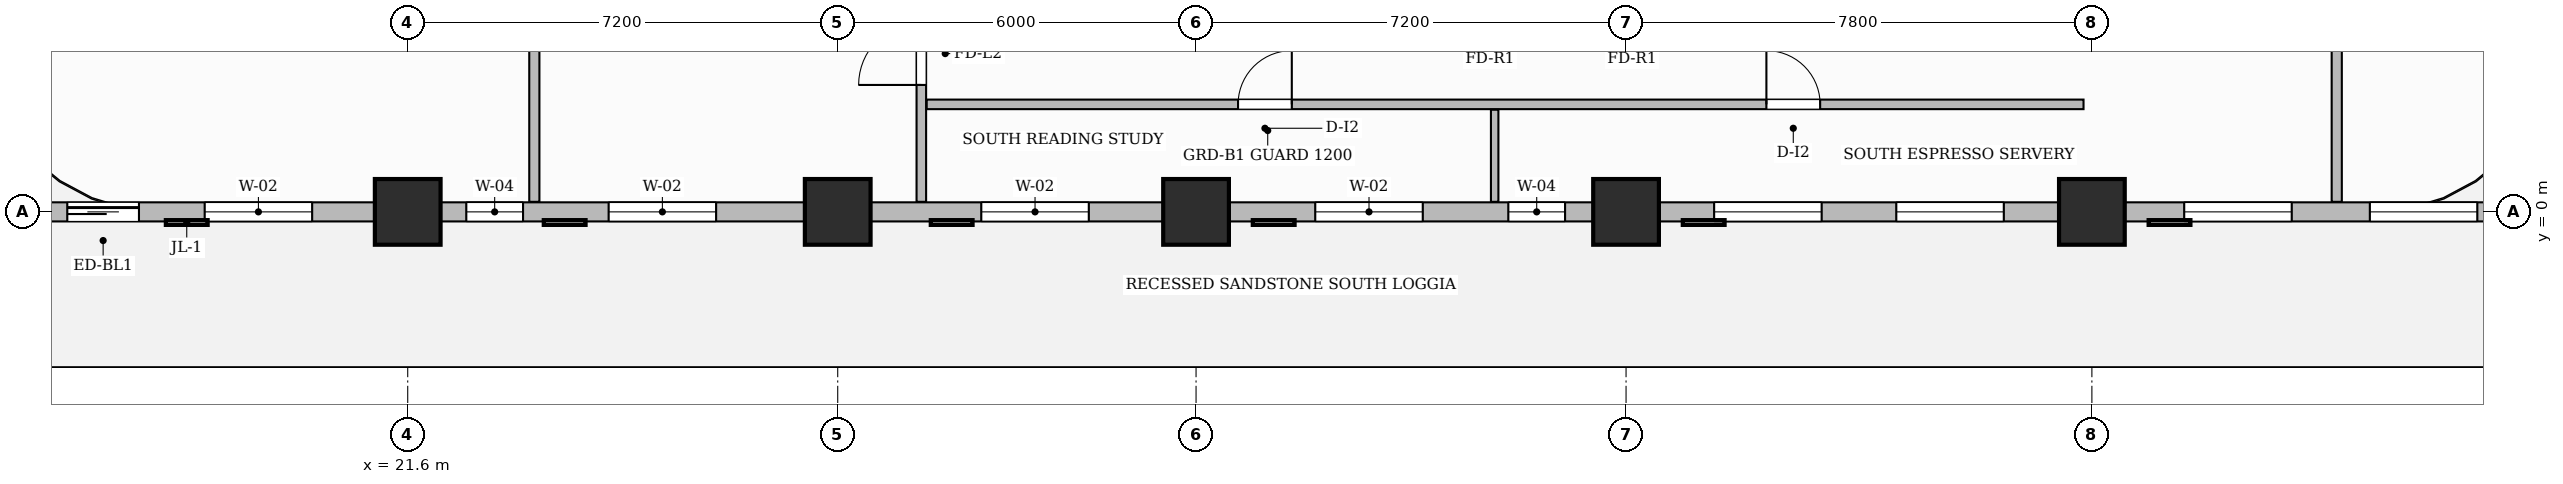
"""IFC4 building model, lengths in metres.
Left out: names, types, materials, properties, quantities, classifications, styles, units other than length and angle.
Written with IfcOpenShell. Run it as: python <this file> out.ifc"""

import sys

from ifc_helpers import new_model, si_unit, direction, frame, frame_2d, origin, origin_2d, place, context, subcontext, project, spatial, rectangle, extrude, source, transform, mapped, element, fill, save


model = new_model("IFC4")
c1 = context("Model", 3, precision=1e-05, world=origin(), true_north=direction((0.0, 1.0)))
c2 = subcontext(c1, "Body", "Model", "MODEL_VIEW")
j1 = project(units=[si_unit("LENGTHUNIT", "METRE"), si_unit("PLANEANGLEUNIT", "RADIAN")], contexts=[c1])
p1 = place(None, origin())
s1 = spatial("IfcSite", under=j1, at=p1, CompositionType="ELEMENT")
p2 = place(p1, origin())
s2 = spatial("IfcBuilding", under=s1, at=p2, CompositionType="ELEMENT")
p3 = place(p2, frame((0.0, 0.0, 39.8)))
s3 = spatial("IfcBuildingStorey", under=s2, at=p3, CompositionType="ELEMENT", Elevation=39.8)
m1 = source(origin(), c2, "Body", "SweptSolid", [
    extrude(rectangle(XDim=1.1, YDim=1.1, at=origin_2d()), origin(), (0.0, 0.0, 1.0), 3.7),
])
for number, where, z_axis, x_axis in (
    (1, (21.6, 0.0, 0.0), (0.0, 0.0, 1.0), (1.0, 0.0, 0.0)),
    (2, (28.8, 0.0, 0.0), (0.0, 0.0, 1.0), (1.0, 0.0, 0.0)),
    (3, (34.8, 0.0, 0.0), (0.0, 0.0, 1.0), (1.0, 0.0, 0.0)),
    (4, (42.0, 0.0, 0.0), (0.0, 0.0, 1.0), (1.0, 0.0, 0.0)),
    (5, (49.8, 0.0, 0.0), (0.0, 0.0, 1.0), (1.0, 0.0, 0.0)),
):
    element("IfcColumn", number, at=place(p3, frame(where, z_axis=z_axis, x_axis=x_axis)), inside=s3, PredefinedType="COLUMN", context=c2, shape_type="MappedRepresentation", body=[
        mapped(m1, transform((0.0, 0.0, 0.0), scale=1.0)),
    ])
p4 = place(p3, frame((30.2, 0.168, 0.0), z_axis=(0.0, 0.0, 1.0), x_axis=(0.0, 1.0, 0.0)))
e6 = element("IfcWall", 6, at=p4, inside=s3, PredefinedType="PARTITIONING", context=c2, shape_type="SweptSolid", body=[
    extrude(rectangle(XDim=9.492, YDim=0.16, at=frame_2d((4.746, 0.0))), origin(), (0.0, 0.0, 1.0), 3.45),
])
p5 = place(p4, frame((1.957, 0.0, 0.0)))
e7 = element("IfcOpeningElement", 7, at=p5, cuts=e6, PredefinedType="OPENING", context=c2, shape_type="SweptSolid", body=[
    extrude(rectangle(XDim=1.05, YDim=2.15, at=frame_2d((0.525, 1.075))), frame((0.0, 0.09, 0.0), z_axis=(0.0, -1.0, 0.0), x_axis=(1.0, 0.0, 0.0)), (0.0, 0.0, 1.0), 0.18),
])
p6 = place(p3, frame((30.29, 1.8, 0.0), z_axis=(0.0, 0.0, 1.0), x_axis=(1.0, 0.0, 0.0)))
e8 = element("IfcWall", 8, at=p6, inside=s3, PredefinedType="PARTITIONING", context=c2, shape_type="SweptSolid", body=[
    extrude(rectangle(XDim=19.37, YDim=0.16, at=frame_2d((9.685, 0.0))), origin(), (0.0, 0.0, 1.0), 3.45),
])
p7 = place(p6, frame((5.213, 0.0, 0.0)))
e9 = element("IfcOpeningElement", 9, at=p7, cuts=e8, PredefinedType="OPENING", context=c2, shape_type="SweptSolid", body=[
    extrude(rectangle(XDim=0.9, YDim=2.15, at=frame_2d((0.45, 1.075))), frame((0.0, 0.09, 0.0), z_axis=(0.0, -1.0, 0.0), x_axis=(1.0, 0.0, 0.0)), (0.0, 0.0, 1.0), 0.18),
])
p8 = place(p6, frame((14.06, 0.0, 0.0)))
e10 = element("IfcOpeningElement", 10, at=p8, cuts=e8, PredefinedType="OPENING", context=c2, shape_type="SweptSolid", body=[
    extrude(rectangle(XDim=0.9, YDim=2.15, at=frame_2d((0.45, 1.075))), frame((0.0, 0.09, 0.0), z_axis=(0.0, -1.0, 0.0), x_axis=(1.0, 0.0, 0.0)), (0.0, 0.0, 1.0), 0.18),
])
p9 = place(p3, frame((39.8, 0.168, 0.0), z_axis=(0.0, 0.0, 1.0), x_axis=(0.0, 1.0, 0.0)))
e11 = element("IfcWall", 11, at=p9, inside=s3, PredefinedType="PARTITIONING", context=c2, shape_type="SweptSolid", body=[
    extrude(rectangle(XDim=1.542, YDim=0.125, at=frame_2d((0.771, 0.0))), origin(), (0.0, 0.0, 1.0), 3.45),
])
p10 = place(p3, frame((53.9, 0.168, 0.0), z_axis=(0.0, 0.0, 1.0), x_axis=(0.0, 1.0, 0.0)))
e12 = element("IfcWall", 12, at=p10, inside=s3, PredefinedType="PARTITIONING", context=c2, shape_type="SweptSolid", body=[
    extrude(rectangle(XDim=14.142, YDim=0.17, at=frame_2d((7.071, 0.0))), origin(), (0.0, 0.0, 1.0), 3.035),
])
p11 = place(p3, frame((23.72, 0.168, 0.0), z_axis=(0.0, 0.0, 1.0), x_axis=(0.0, 1.0, 0.0)))
e13 = element("IfcWall", 13, at=p11, inside=s3, PredefinedType="PARTITIONING", context=c2, shape_type="SweptSolid", body=[
    extrude(rectangle(XDim=9.492, YDim=0.17, at=frame_2d((4.746, 0.0))), origin(), (0.0, 0.0, 1.0), 3.45),
])
p12 = place(p3, frame((14.4, 0.0, 0.0), z_axis=(0.0, 0.0, 1.0), x_axis=(1.0, 0.0, 0.0)))
e14 = element("IfcWall", 14, at=p12, inside=s3, PredefinedType="SOLIDWALL", context=c2, shape_type="SweptSolid", body=[
    extrude(rectangle(XDim=43.2, YDim=0.32, at=frame_2d((21.6, 0.0))), origin(), (0.0, 0.0, 1.0), 2.885),
])
p13 = place(p12, frame((1.5, 0.0, 0.0)))
e15 = element("IfcOpeningElement", 15, at=p13, cuts=e14, PredefinedType="OPENING", context=c2, shape_type="SweptSolid", body=[
    extrude(rectangle(XDim=1.2, YDim=2.2, at=frame_2d((0.6, 1.1))), frame((0.0, 0.17, 0.0), z_axis=(0.0, -1.0, 0.0), x_axis=(1.0, 0.0, 0.0)), (0.0, 0.0, 1.0), 0.34),
])
p14 = place(p12, frame((3.8, 0.0, 0.8)))
e16 = element("IfcOpeningElement", 16, at=p14, cuts=e14, PredefinedType="OPENING", context=c2, shape_type="SweptSolid", body=[
    extrude(rectangle(XDim=1.8, YDim=1.85, at=frame_2d((0.9, 0.925))), frame((0.0, 0.17, 0.0), z_axis=(0.0, -1.0, 0.0), x_axis=(1.0, 0.0, 0.0)), (0.0, 0.0, 1.0), 0.34),
])
p15 = place(p12, frame((8.181, 0.0, 0.8)))
e17 = element("IfcOpeningElement", 17, at=p15, cuts=e14, PredefinedType="OPENING", context=c2, shape_type="SweptSolid", body=[
    extrude(rectangle(XDim=0.95, YDim=1.75, at=frame_2d((0.475, 0.875))), frame((0.0, 0.17, 0.0), z_axis=(0.0, -1.0, 0.0), x_axis=(1.0, 0.0, 0.0)), (0.0, 0.0, 1.0), 0.34),
])
p16 = place(p12, frame((10.564, 0.0, 0.8)))
e18 = element("IfcOpeningElement", 18, at=p16, cuts=e14, PredefinedType="OPENING", context=c2, shape_type="SweptSolid", body=[
    extrude(rectangle(XDim=1.8, YDim=1.85, at=frame_2d((0.9, 0.925))), frame((0.0, 0.17, 0.0), z_axis=(0.0, -1.0, 0.0), x_axis=(1.0, 0.0, 0.0)), (0.0, 0.0, 1.0), 0.34),
])
p17 = place(p12, frame((16.804, 0.0, 0.8)))
e19 = element("IfcOpeningElement", 19, at=p17, cuts=e14, PredefinedType="OPENING", context=c2, shape_type="SweptSolid", body=[
    extrude(rectangle(XDim=1.8, YDim=1.85, at=frame_2d((0.9, 0.925))), frame((0.0, 0.17, 0.0), z_axis=(0.0, -1.0, 0.0), x_axis=(1.0, 0.0, 0.0)), (0.0, 0.0, 1.0), 0.34),
])
p18 = place(p12, frame((22.396, 0.0, 0.8)))
e20 = element("IfcOpeningElement", 20, at=p18, cuts=e14, PredefinedType="OPENING", context=c2, shape_type="SweptSolid", body=[
    extrude(rectangle(XDim=1.8, YDim=1.85, at=frame_2d((0.9, 0.925))), frame((0.0, 0.17, 0.0), z_axis=(0.0, -1.0, 0.0), x_axis=(1.0, 0.0, 0.0)), (0.0, 0.0, 1.0), 0.34),
])
p19 = place(p12, frame((25.629, 0.0, 0.8)))
e21 = element("IfcOpeningElement", 21, at=p19, cuts=e14, PredefinedType="OPENING", context=c2, shape_type="SweptSolid", body=[
    extrude(rectangle(XDim=0.95, YDim=1.75, at=frame_2d((0.475, 0.875))), frame((0.0, 0.17, 0.0), z_axis=(0.0, -1.0, 0.0), x_axis=(1.0, 0.0, 0.0)), (0.0, 0.0, 1.0), 0.34),
])
p20 = place(p12, frame((29.075, 0.0, 0.8)))
e22 = element("IfcOpeningElement", 22, at=p20, cuts=e14, PredefinedType="OPENING", context=c2, shape_type="SweptSolid", body=[
    extrude(rectangle(XDim=1.8, YDim=1.85, at=frame_2d((0.9, 0.925))), frame((0.0, 0.17, 0.0), z_axis=(0.0, -1.0, 0.0), x_axis=(1.0, 0.0, 0.0)), (0.0, 0.0, 1.0), 0.34),
])
p21 = place(p12, frame((32.125, 0.0, 0.8)))
e23 = element("IfcOpeningElement", 23, at=p21, cuts=e14, PredefinedType="OPENING", context=c2, shape_type="SweptSolid", body=[
    extrude(rectangle(XDim=1.8, YDim=1.85, at=frame_2d((0.9, 0.925))), frame((0.0, 0.17, 0.0), z_axis=(0.0, -1.0, 0.0), x_axis=(1.0, 0.0, 0.0)), (0.0, 0.0, 1.0), 0.34),
])
p22 = place(p12, frame((36.946, 0.0, 0.8)))
e24 = element("IfcOpeningElement", 24, at=p22, cuts=e14, PredefinedType="OPENING", context=c2, shape_type="SweptSolid", body=[
    extrude(rectangle(XDim=1.8, YDim=1.85, at=frame_2d((0.9, 0.925))), frame((0.0, 0.17, 0.0), z_axis=(0.0, -1.0, 0.0), x_axis=(1.0, 0.0, 0.0)), (0.0, 0.0, 1.0), 0.34),
])
p23 = place(p12, frame((40.054, 0.0, 0.8)))
e25 = element("IfcOpeningElement", 25, at=p23, cuts=e14, PredefinedType="OPENING", context=c2, shape_type="SweptSolid", body=[
    extrude(rectangle(XDim=1.8, YDim=1.85, at=frame_2d((0.9, 0.925))), frame((0.0, 0.17, 0.0), z_axis=(0.0, -1.0, 0.0), x_axis=(1.0, 0.0, 0.0)), (0.0, 0.0, 1.0), 0.34),
])
m2 = source(origin(), c2, "Body", "SweptSolid", [
    extrude(rectangle(XDim=1.05, YDim=2.15, at=frame_2d((0.525, 1.075))), frame((0.0, 0.025, 0.0), z_axis=(0.0, -1.0, 0.0), x_axis=(1.0, 0.0, 0.0)), (0.0, 0.0, 1.0), 0.05),
])
p24 = place(p5, origin())
e26 = element("IfcDoor", 26, at=p24, inside=s3, OperationType="SINGLE_SWING_LEFT", PredefinedType="DOOR", context=c2, shape_type="MappedRepresentation", body=[
    mapped(m2, transform((0.0, 0.0, 0.0), scale=1.0)),
])
fill(e7, e26)
m3 = source(origin(), c2, "Body", "SweptSolid", [
    extrude(rectangle(XDim=0.9, YDim=2.15, at=frame_2d((0.45, 1.075))), frame((0.0, 0.025, 0.0), z_axis=(0.0, -1.0, 0.0), x_axis=(1.0, 0.0, 0.0)), (0.0, 0.0, 1.0), 0.05),
])
p25 = place(p7, origin())
e27 = element("IfcDoor", 27, at=p25, inside=s3, OperationType="SINGLE_SWING_RIGHT", PredefinedType="DOOR", context=c2, shape_type="MappedRepresentation", body=[
    mapped(m3, transform((0.0, 0.0, 0.0), scale=1.0)),
])
fill(e9, e27)
p26 = place(p8, origin())
e28 = element("IfcDoor", 28, at=p26, inside=s3, OperationType="SINGLE_SWING_LEFT", PredefinedType="DOOR", context=c2, shape_type="MappedRepresentation", body=[
    mapped(m3, transform((0.0, 0.0, 0.0), scale=1.0)),
])
fill(e10, e28)
m4 = source(origin(), c2, "Body", "SweptSolid", [
    extrude(rectangle(XDim=1.2, YDim=2.2, at=frame_2d((0.6, 1.1))), frame((0.0, 0.025, 0.0), z_axis=(0.0, -1.0, 0.0), x_axis=(1.0, 0.0, 0.0)), (0.0, 0.0, 1.0), 0.05),
])
p27 = place(p13, origin())
e29 = element("IfcDoor", 29, at=p27, inside=s3, OperationType="SLIDING_TO_LEFT", PredefinedType="DOOR", context=c2, shape_type="MappedRepresentation", body=[
    mapped(m4, transform((0.0, 0.0, 0.0), scale=1.0)),
])
fill(e15, e29)
m5 = source(origin(), c2, "Body", "SweptSolid", [
    extrude(rectangle(XDim=1.8, YDim=1.85, at=frame_2d((0.9, 0.925))), frame((0.0, 0.03, 0.0), z_axis=(0.0, -1.0, 0.0), x_axis=(1.0, 0.0, 0.0)), (0.0, 0.0, 1.0), 0.06),
])
p28 = place(p14, origin())
e30 = element("IfcWindow", 30, at=p28, inside=s3, PartitioningType="DOUBLE_PANEL_VERTICAL", PredefinedType="WINDOW", context=c2, shape_type="MappedRepresentation", body=[
    mapped(m5, transform((0.0, 0.0, 0.0), scale=1.0)),
])
fill(e16, e30)
m6 = source(origin(), c2, "Body", "SweptSolid", [
    extrude(rectangle(XDim=0.95, YDim=1.75, at=frame_2d((0.475, 0.875))), frame((0.0, 0.03, 0.0), z_axis=(0.0, -1.0, 0.0), x_axis=(1.0, 0.0, 0.0)), (0.0, 0.0, 1.0), 0.06),
])
p29 = place(p15, origin())
e31 = element("IfcWindow", 31, at=p29, inside=s3, PartitioningType="SINGLE_PANEL", PredefinedType="WINDOW", context=c2, shape_type="MappedRepresentation", body=[
    mapped(m6, transform((0.0, 0.0, 0.0), scale=1.0)),
])
fill(e17, e31)
p30 = place(p16, origin())
e32 = element("IfcWindow", 32, at=p30, inside=s3, PartitioningType="DOUBLE_PANEL_VERTICAL", PredefinedType="WINDOW", context=c2, shape_type="MappedRepresentation", body=[
    mapped(m5, transform((0.0, 0.0, 0.0), scale=1.0)),
])
fill(e18, e32)
p31 = place(p17, origin())
e33 = element("IfcWindow", 33, at=p31, inside=s3, PartitioningType="DOUBLE_PANEL_VERTICAL", PredefinedType="WINDOW", context=c2, shape_type="MappedRepresentation", body=[
    mapped(m5, transform((0.0, 0.0, 0.0), scale=1.0)),
])
fill(e19, e33)
p32 = place(p18, origin())
e34 = element("IfcWindow", 34, at=p32, inside=s3, PartitioningType="DOUBLE_PANEL_VERTICAL", PredefinedType="WINDOW", context=c2, shape_type="MappedRepresentation", body=[
    mapped(m5, transform((0.0, 0.0, 0.0), scale=1.0)),
])
fill(e20, e34)
p33 = place(p19, origin())
e35 = element("IfcWindow", 35, at=p33, inside=s3, PartitioningType="SINGLE_PANEL", PredefinedType="WINDOW", context=c2, shape_type="MappedRepresentation", body=[
    mapped(m6, transform((0.0, 0.0, 0.0), scale=1.0)),
])
fill(e21, e35)
p34 = place(p20, origin())
e36 = element("IfcWindow", 36, at=p34, inside=s3, PartitioningType="DOUBLE_PANEL_VERTICAL", PredefinedType="WINDOW", context=c2, shape_type="MappedRepresentation", body=[
    mapped(m5, transform((0.0, 0.0, 0.0), scale=1.0)),
])
fill(e22, e36)
p35 = place(p21, origin())
e37 = element("IfcWindow", 37, at=p35, inside=s3, PartitioningType="DOUBLE_PANEL_VERTICAL", PredefinedType="WINDOW", context=c2, shape_type="MappedRepresentation", body=[
    mapped(m5, transform((0.0, 0.0, 0.0), scale=1.0)),
])
fill(e23, e37)
p36 = place(p22, origin())
e38 = element("IfcWindow", 38, at=p36, inside=s3, PartitioningType="DOUBLE_PANEL_VERTICAL", PredefinedType="WINDOW", context=c2, shape_type="MappedRepresentation", body=[
    mapped(m5, transform((0.0, 0.0, 0.0), scale=1.0)),
])
fill(e24, e38)
p37 = place(p23, origin())
e39 = element("IfcWindow", 39, at=p37, inside=s3, PartitioningType="DOUBLE_PANEL_VERTICAL", PredefinedType="WINDOW", context=c2, shape_type="MappedRepresentation", body=[
    mapped(m5, transform((0.0, 0.0, 0.0), scale=1.0)),
])
fill(e25, e39)
save(model, sys.argv[1])
